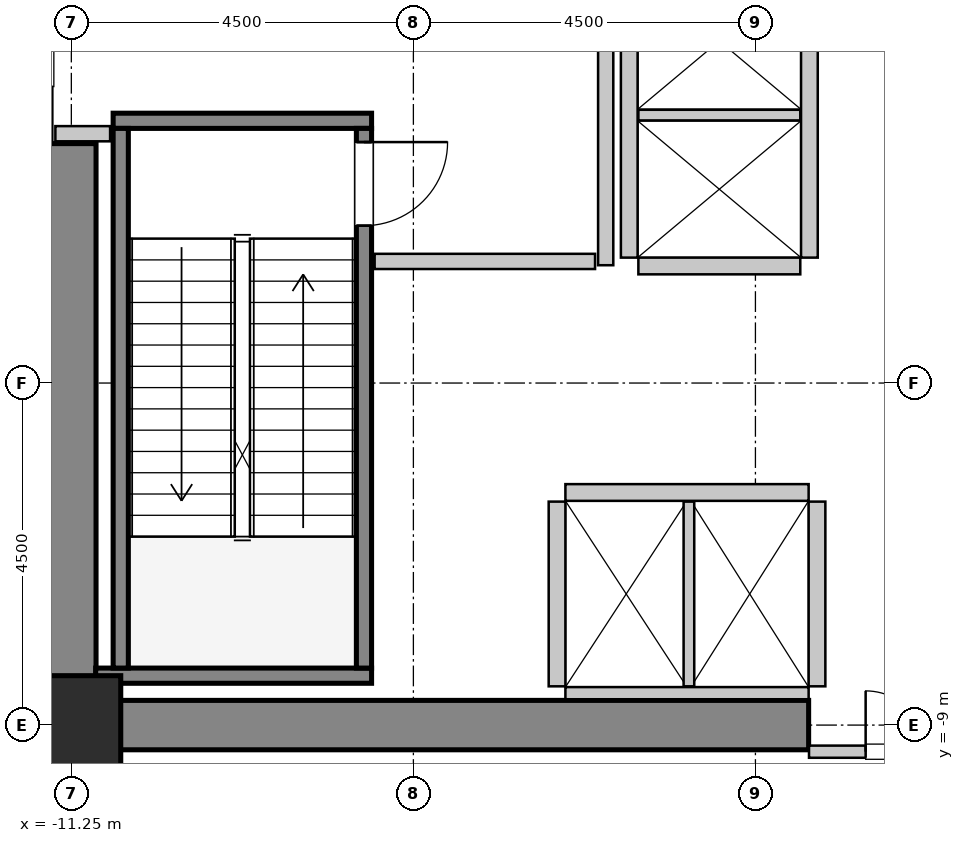
"""IFC4 building model, lengths in metres.
Left out: names, types, materials, properties, quantities, classifications, styles, units other than length and angle.
Written with IfcOpenShell. Run it as: python <this file> out.ifc"""

import sys

from ifc_helpers import new_model, si_unit, direction, frame, frame_2d, origin, origin_2d, place, context, subcontext, project, spatial, rectangle, hollow_rectangle, extrude, source, transform, mapped, element, fill, save


model = new_model("IFC4")
c1 = context("Model", 3, precision=1e-05, world=origin(), true_north=direction((0.0, 1.0)))
c2 = subcontext(c1, "Body", "Model", "MODEL_VIEW")
j1 = project(units=[si_unit("LENGTHUNIT", "METRE"), si_unit("PLANEANGLEUNIT", "RADIAN")], contexts=[c1])
p1 = place(None, origin())
s1 = spatial("IfcSite", under=j1, at=p1, CompositionType="ELEMENT")
p2 = place(p1, origin())
s2 = spatial("IfcBuilding", under=s1, at=p2, CompositionType="ELEMENT")
p3 = place(p2, frame((0.0, 0.0, 6.0)))
s3 = spatial("IfcBuildingStorey", under=s2, at=p3, CompositionType="ELEMENT", Elevation=6.0)
m1 = source(origin(), c2, "Body", "SweptSolid", [
    extrude(rectangle(XDim=10.025, YDim=0.65, at=frame_2d((5.012, 0.0))), origin(), (0.0, 0.0, 1.0), 5.4),
])
p4 = place(p3, frame((-11.575, -9.0, 0.0), z_axis=(0.0, 0.0, 1.0), x_axis=(1.0, 0.0, 0.0)))
e1 = element("IfcWall", 1, at=p4, inside=s3, PredefinedType="SHEAR", context=c2, shape_type="MappedRepresentation", body=[
    mapped(m1, transform((0.0, 0.0, 0.0), x_axis=(1.0, 0.0, 0.0), y_axis=(0.0, 1.0, 0.0), z_axis=(0.0, 0.0, 1.0), scale=1.0)),
])
m2 = source(origin(), c2, "Body", "SweptSolid", [
    extrude(rectangle(XDim=7.325, YDim=0.65, at=frame_2d((3.663, 0.0))), origin(), (0.0, 0.0, 1.0), 5.4),
])
p5 = place(p3, frame((-11.25, -8.675, 0.0), z_axis=(0.0, 0.0, 1.0), x_axis=(0.0, 1.0, 0.0)))
e2 = element("IfcWall", 2, at=p5, inside=s3, PredefinedType="SHEAR", context=c2, shape_type="MappedRepresentation", body=[
    mapped(m2, transform((0.0, 0.0, 0.0), x_axis=(1.0, 0.0, 0.0), y_axis=(0.0, 1.0, 0.0), z_axis=(0.0, 0.0, 1.0), scale=1.0)),
])
m3 = source(origin(), c2, "Body", "SweptSolid", [
    extrude(hollow_rectangle(XDim=1.3, YDim=1.3, WallThickness=0.065, InnerFilletRadius=0.065, OuterFilletRadius=0.13, at=origin_2d()), origin(), (0.0, 0.0, 1.0), 5.4),
])
p6 = place(p3, frame((-11.25, -9.0, 0.0), z_axis=(0.0, 0.0, 1.0), x_axis=(1.0, 0.0, 0.0)))
e3 = element("IfcColumn", 3, at=p6, inside=s3, PredefinedType="COLUMN", context=c2, shape_type="MappedRepresentation", body=[
    mapped(m3, transform((0.0, 0.0, 0.0), x_axis=(1.0, 0.0, 0.0), y_axis=(0.0, 1.0, 0.0), z_axis=(0.0, 0.0, 1.0), scale=1.0)),
])
m4 = source(origin(), c2, "Body", "SweptSolid", [
    extrude(rectangle(XDim=3.4, YDim=0.2, at=frame_2d((1.7, 0.0))), origin(), (0.0, 0.0, 1.0), 5.4),
])
p7 = place(p3, frame((-10.7, -1.05, 0.0), z_axis=(0.0, 0.0, 1.0), x_axis=(1.0, 0.0, 0.0)))
e4 = element("IfcWall", 4, at=p7, inside=s3, PredefinedType="SOLIDWALL", context=c2, shape_type="MappedRepresentation", body=[
    mapped(m4, transform((0.0, 0.0, 0.0), x_axis=(1.0, 0.0, 0.0), y_axis=(0.0, 1.0, 0.0), z_axis=(0.0, 0.0, 1.0), scale=1.0)),
])
m5 = source(origin(), c2, "Body", "SweptSolid", [
    extrude(rectangle(XDim=3.63, YDim=0.2, at=frame_2d((1.815, 0.0))), origin(), (0.0, 0.0, 1.0), 5.4),
])
p8 = place(p3, frame((-10.93, -8.35, 0.0), z_axis=(0.0, 0.0, 1.0), x_axis=(1.0, 0.0, 0.0)))
e5 = element("IfcWall", 5, at=p8, inside=s3, PredefinedType="SOLIDWALL", context=c2, shape_type="MappedRepresentation", body=[
    mapped(m5, transform((0.0, 0.0, 0.0), x_axis=(1.0, 0.0, 0.0), y_axis=(0.0, 1.0, 0.0), z_axis=(0.0, 0.0, 1.0), scale=1.0)),
])
m6 = source(origin(), c2, "Body", "SweptSolid", [
    extrude(rectangle(XDim=7.1, YDim=0.2, at=frame_2d((3.55, 0.0))), origin(), (0.0, 0.0, 1.0), 5.4),
])
p9 = place(p3, frame((-10.6, -1.15, 0.0), z_axis=(0.0, 0.0, 1.0), x_axis=(0.0, -1.0, 0.0)))
e6 = element("IfcWall", 6, at=p9, inside=s3, PredefinedType="SOLIDWALL", context=c2, shape_type="MappedRepresentation", body=[
    mapped(m6, transform((0.0, 0.0, 0.0), x_axis=(1.0, 0.0, 0.0), y_axis=(0.0, 1.0, 0.0), z_axis=(0.0, 0.0, 1.0), scale=1.0)),
])
p10 = place(p3, frame((-7.4, -1.15, 0.0), z_axis=(0.0, 0.0, 1.0), x_axis=(0.0, -1.0, 0.0)))
e7 = element("IfcWall", 7, at=p10, inside=s3, PredefinedType="SOLIDWALL", context=c2, shape_type="MappedRepresentation", body=[
    mapped(m6, transform((0.0, 0.0, 0.0), x_axis=(1.0, 0.0, 0.0), y_axis=(0.0, 1.0, 0.0), z_axis=(0.0, 0.0, 1.0), scale=1.0)),
])
p11 = place(p10, frame((0.18, 0.0, 0.0)))
e8 = element("IfcOpeningElement", 8, at=p11, cuts=e7, PredefinedType="OPENING", context=c2, shape_type="SweptSolid", body=[
    extrude(rectangle(XDim=1.1, YDim=2.15, at=frame_2d((0.55, 1.075))), frame((0.0, 0.11, 0.0), z_axis=(0.0, -1.0, 0.0), x_axis=(1.0, 0.0, 0.0)), (0.0, 0.0, 1.0), 0.22),
])
m7 = source(origin(), c2, "Body", "SweptSolid", [
    extrude(rectangle(XDim=3.2, YDim=0.22, at=frame_2d((1.6, 0.0))), origin(), (0.0, 0.0, 1.0), 5.085),
])
p12 = place(p3, frame((-1.55, -5.94, 0.0), z_axis=(0.0, 0.0, 1.0), x_axis=(-1.0, 0.0, 0.0)))
e9 = element("IfcWall", 9, at=p12, inside=s3, PredefinedType="SOLIDWALL", context=c2, shape_type="MappedRepresentation", body=[
    mapped(m7, transform((0.0, 0.0, 0.0), x_axis=(1.0, 0.0, 0.0), y_axis=(0.0, 1.0, 0.0), z_axis=(0.0, 0.0, 1.0), scale=1.0)),
])
m8 = source(origin(), c2, "Body", "SweptSolid", [
    extrude(rectangle(XDim=3.2, YDim=0.16, at=frame_2d((1.6, 0.0))), origin(), (0.0, 0.0, 1.0), 3.975),
])
p13 = place(p3, frame((-4.75, -8.58, 0.0), z_axis=(0.0, 0.0, 1.0), x_axis=(1.0, 0.0, 0.0)))
e10 = element("IfcWall", 10, at=p13, inside=s3, PredefinedType="PARTITIONING", context=c2, shape_type="MappedRepresentation", body=[
    mapped(m8, transform((0.0, 0.0, 0.0), x_axis=(1.0, 0.0, 0.0), y_axis=(0.0, 1.0, 0.0), z_axis=(0.0, 0.0, 1.0), scale=1.0)),
])
m9 = source(origin(), c2, "Body", "SweptSolid", [
    extrude(rectangle(XDim=2.43, YDim=0.22, at=frame_2d((1.215, 0.0))), origin(), (0.0, 0.0, 1.0), 5.085),
])
p14 = place(p3, frame((-4.86, -6.06, 0.0), z_axis=(0.0, 0.0, 1.0), x_axis=(0.0, -1.0, 0.0)))
e11 = element("IfcWall", 11, at=p14, inside=s3, PredefinedType="SOLIDWALL", context=c2, shape_type="MappedRepresentation", body=[
    mapped(m9, transform((0.0, 0.0, 0.0), x_axis=(1.0, 0.0, 0.0), y_axis=(0.0, 1.0, 0.0), z_axis=(0.0, 0.0, 1.0), scale=1.0)),
])
m10 = source(origin(), c2, "Body", "SweptSolid", [
    extrude(rectangle(XDim=2.43, YDim=0.14, at=frame_2d((1.215, 0.0))), origin(), (0.0, 0.0, 1.0), 5.085),
])
p15 = place(p3, frame((-3.125, -8.49, 0.0), z_axis=(0.0, 0.0, 1.0), x_axis=(0.0, 1.0, 0.0)))
e12 = element("IfcWall", 12, at=p15, inside=s3, PredefinedType="PARTITIONING", context=c2, shape_type="MappedRepresentation", body=[
    mapped(m10, transform((0.0, 0.0, 0.0), x_axis=(1.0, 0.0, 0.0), y_axis=(0.0, 1.0, 0.0), z_axis=(0.0, 0.0, 1.0), scale=1.0)),
])
p16 = place(p3, frame((-1.44, -8.49, 0.0), z_axis=(0.0, 0.0, 1.0), x_axis=(0.0, 1.0, 0.0)))
e13 = element("IfcWall", 13, at=p16, inside=s3, PredefinedType="SOLIDWALL", context=c2, shape_type="MappedRepresentation", body=[
    mapped(m9, transform((0.0, 0.0, 0.0), x_axis=(1.0, 0.0, 0.0), y_axis=(0.0, 1.0, 0.0), z_axis=(0.0, 0.0, 1.0), scale=1.0)),
])
m11 = source(origin(), c2, "Body", "SweptSolid", [
    extrude(rectangle(XDim=5.7, YDim=0.22, at=frame_2d((2.85, 0.0))), origin(), (0.0, 0.0, 1.0), 5.085),
])
for number, where, z_axis, x_axis in (
    (14, (-1.54, -2.85, 0.0), (0.0, 0.0, 1.0), (0.0, 1.0, 0.0)),
    (15, (-3.91, 2.85, 0.0), (0.0, 0.0, 1.0), (0.0, -1.0, 0.0)),
):
    element("IfcWall", number, at=place(p3, frame(where, z_axis=z_axis, x_axis=x_axis)), inside=s3, PredefinedType="SOLIDWALL", context=c2, shape_type="MappedRepresentation", body=[
        mapped(m11, transform((0.0, 0.0, 0.0), x_axis=(1.0, 0.0, 0.0), y_axis=(0.0, 1.0, 0.0), z_axis=(0.0, 0.0, 1.0), scale=1.0)),
    ])
m12 = source(origin(), c2, "Body", "SweptSolid", [
    extrude(rectangle(XDim=2.13, YDim=0.22, at=frame_2d((1.065, 0.0))), origin(), (0.0, 0.0, 1.0), 5.085),
])
p17 = place(p3, frame((-3.79, -2.96, 0.0), z_axis=(0.0, 0.0, 1.0), x_axis=(1.0, 0.0, 0.0)))
e16 = element("IfcWall", 16, at=p17, inside=s3, PredefinedType="SOLIDWALL", context=c2, shape_type="MappedRepresentation", body=[
    mapped(m12, transform((0.0, 0.0, 0.0), x_axis=(1.0, 0.0, 0.0), y_axis=(0.0, 1.0, 0.0), z_axis=(0.0, 0.0, 1.0), scale=1.0)),
])
m13 = source(origin(), c2, "Body", "SweptSolid", [
    extrude(rectangle(XDim=2.13, YDim=0.14, at=frame_2d((1.065, 0.0))), origin(), (0.0, 0.0, 1.0), 5.085),
])
p18 = place(p3, frame((-3.79, -0.975, 0.0), z_axis=(0.0, 0.0, 1.0), x_axis=(1.0, 0.0, 0.0)))
e17 = element("IfcWall", 17, at=p18, inside=s3, PredefinedType="PARTITIONING", context=c2, shape_type="MappedRepresentation", body=[
    mapped(m13, transform((0.0, 0.0, 0.0), x_axis=(1.0, 0.0, 0.0), y_axis=(0.0, 1.0, 0.0), z_axis=(0.0, 0.0, 1.0), scale=1.0)),
])
m14 = source(origin(), c2, "Body", "SweptSolid", [
    extrude(rectangle(XDim=5.9, YDim=0.2, at=frame_2d((2.95, 0.0))), origin(), (0.0, 0.0, 1.0), 5.085),
])
p19 = place(p3, frame((-4.22, -2.95, 0.0), z_axis=(0.0, 0.0, 1.0), x_axis=(0.0, 1.0, 0.0)))
e18 = element("IfcWall", 18, at=p19, inside=s3, PredefinedType="PARTITIONING", context=c2, shape_type="MappedRepresentation", body=[
    mapped(m14, transform((0.0, 0.0, 0.0), x_axis=(1.0, 0.0, 0.0), y_axis=(0.0, 1.0, 0.0), z_axis=(0.0, 0.0, 1.0), scale=1.0)),
])
m15 = source(origin(), c2, "Body", "SweptSolid", [
    extrude(rectangle(XDim=2.9, YDim=0.2, at=frame_2d((1.45, 0.0))), origin(), (0.0, 0.0, 1.0), 5.085),
])
p20 = place(p3, frame((-7.26, -2.9, 0.0), z_axis=(0.0, 0.0, 1.0), x_axis=(1.0, 0.0, 0.0)))
e19 = element("IfcWall", 19, at=p20, inside=s3, PredefinedType="PARTITIONING", context=c2, shape_type="MappedRepresentation", body=[
    mapped(m15, transform((0.0, 0.0, 0.0), x_axis=(1.0, 0.0, 0.0), y_axis=(0.0, 1.0, 0.0), z_axis=(0.0, 0.0, 1.0), scale=1.0)),
])
m16 = source(origin(), c2, "Body", "SweptSolid", [
    extrude(rectangle(XDim=0.72, YDim=0.2, at=frame_2d((0.36, 0.0))), origin(), (0.0, 0.0, 1.0), 5.085),
])
p21 = place(p3, frame((-11.46, -1.22, 0.0), z_axis=(0.0, 0.0, 1.0), x_axis=(1.0, 0.0, 0.0)))
e20 = element("IfcWall", 20, at=p21, inside=s3, PredefinedType="PARTITIONING", context=c2, shape_type="MappedRepresentation", body=[
    mapped(m16, transform((0.0, 0.0, 0.0), x_axis=(1.0, 0.0, 0.0), y_axis=(0.0, 1.0, 0.0), z_axis=(0.0, 0.0, 1.0), scale=1.0)),
])
m17 = source(origin(), c2, "Body", "SweptSolid", [
    extrude(rectangle(XDim=3.09, YDim=0.16, at=frame_2d((1.545, 0.0))), origin(), (0.0, 0.0, 1.0), 3.975),
])
p22 = place(p3, frame((-1.545, -9.35, 0.0), z_axis=(0.0, 0.0, 1.0), x_axis=(1.0, 0.0, 0.0)))
e21 = element("IfcWall", 21, at=p22, inside=s3, PredefinedType="PARTITIONING", context=c2, shape_type="MappedRepresentation", body=[
    mapped(m17, transform((0.0, 0.0, 0.0), x_axis=(1.0, 0.0, 0.0), y_axis=(0.0, 1.0, 0.0), z_axis=(0.0, 0.0, 1.0), scale=1.0)),
])
p23 = place(p22, frame((0.745, 0.0, 0.0)))
e22 = element("IfcOpeningElement", 22, at=p23, cuts=e21, PredefinedType="OPENING", context=c2, shape_type="SweptSolid", body=[
    extrude(rectangle(XDim=1.6, YDim=2.3, at=frame_2d((0.8, 1.15))), frame((0.0, 0.09, 0.0), z_axis=(0.0, -1.0, 0.0), x_axis=(1.0, 0.0, 0.0)), (0.0, 0.0, 1.0), 0.18),
])
m18 = source(origin(), c2, "Body", "SweptSolid", [
    extrude(rectangle(XDim=1.1, YDim=2.15, at=frame_2d((0.55, 1.075))), frame((0.0, 0.025, 0.0), z_axis=(0.0, -1.0, 0.0), x_axis=(1.0, 0.0, 0.0)), (0.0, 0.0, 1.0), 0.05),
])
p24 = place(p11, origin())
e23 = element("IfcDoor", 23, at=p24, inside=s3, OperationType="SINGLE_SWING_LEFT", PredefinedType="DOOR", context=c2, shape_type="MappedRepresentation", body=[
    mapped(m18, transform((0.0, 0.0, 0.0), x_axis=(1.0, 0.0, 0.0), y_axis=(0.0, 1.0, 0.0), z_axis=(0.0, 0.0, 1.0), scale=1.0)),
])
fill(e8, e23)
m19 = source(origin(), c2, "Body", "SweptSolid", [
    extrude(rectangle(XDim=1.6, YDim=2.3, at=frame_2d((0.8, 1.15))), frame((0.0, 0.025, 0.0), z_axis=(0.0, -1.0, 0.0), x_axis=(1.0, 0.0, 0.0)), (0.0, 0.0, 1.0), 0.05),
])
p25 = place(p23, origin())
e24 = element("IfcDoor", 24, at=p25, inside=s3, OperationType="DOUBLE_DOOR_SINGLE_SWING", PredefinedType="DOOR", context=c2, shape_type="MappedRepresentation", body=[
    mapped(m19, transform((0.0, 0.0, 0.0), x_axis=(1.0, 0.0, 0.0), y_axis=(0.0, 1.0, 0.0), z_axis=(0.0, 0.0, 1.0), scale=1.0)),
])
fill(e22, e24)
save(model, sys.argv[1])
